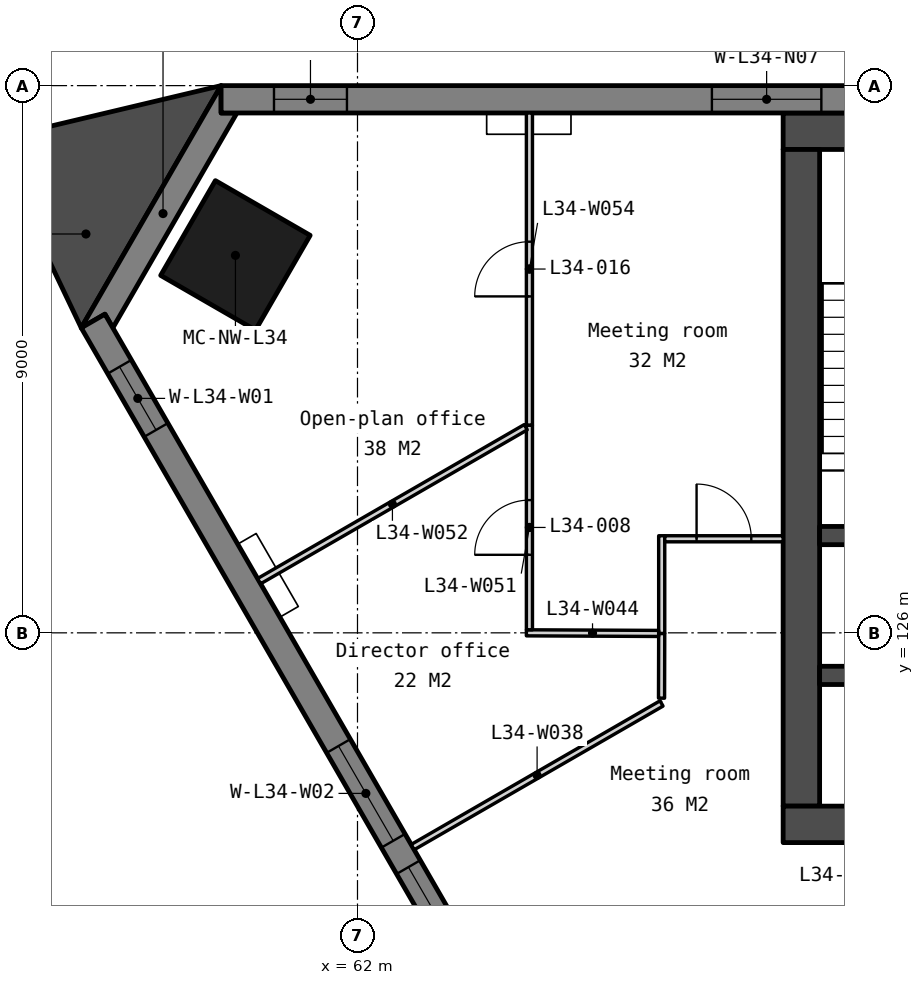
"""IFC4 building model, lengths in metres.
Left out: names, types, materials, properties, quantities, classifications, styles, units other than length and angle.
Written with IfcOpenShell. Run it as: python <this file> out.ifc"""

import sys

from ifc_helpers import new_model, si_unit, direction, frame, frame_2d, origin, origin_2d, place, context, subcontext, project, spatial, polyline, rectangle, outline, extrude, element, fill, save


model = new_model("IFC4")
c1 = context("Model", 3, precision=1e-05, world=origin(), true_north=direction((0.0, 1.0)))
c2 = subcontext(c1, "Body", "Model", "MODEL_VIEW")
j1 = project(units=[si_unit("LENGTHUNIT", "METRE"), si_unit("PLANEANGLEUNIT", "RADIAN")], contexts=[c1])
p1 = place(None, origin())
s1 = spatial("IfcSite", under=j1, at=p1, CompositionType="ELEMENT")
p2 = place(p1, origin())
s2 = spatial("IfcBuilding", under=s1, at=p2, CompositionType="ELEMENT")
p3 = place(p2, frame((0.0, 0.0, 136.4)))
s3 = spatial("IfcBuildingStorey", under=s2, at=p3, CompositionType="ELEMENT", Elevation=136.4)
p4 = place(p3, frame((59.993, 132.208, 0.0), z_axis=(0.0, 0.0, 1.0), x_axis=(-0.5, -0.866025403784, 0.0)))
e1 = element("IfcColumn", 1, at=p4, inside=s3, PredefinedType="COLUMN", context=c2, shape_type="SweptSolid", body=[
    extrude(rectangle(XDim=1.8, YDim=1.8, at=origin_2d()), origin(), (0.0, 0.0, 1.0), 3.9),
])
p5 = place(p3, frame((69.0, 134.25, 0.0), z_axis=(0.0, 0.0, 1.0), x_axis=(1.0, 0.0, 0.0)))
e2 = element("IfcWall", 2, at=p5, inside=s3, PredefinedType="SOLIDWALL", context=c2, shape_type="SweptSolid", body=[
    extrude(rectangle(XDim=22.0, YDim=0.6, at=frame_2d((11.0, 0.0))), origin(), (0.0, 0.0, 1.0), 3.75),
])
p6 = place(p3, frame((69.3, 133.95, 0.0), z_axis=(0.0, 0.0, 1.0), x_axis=(0.0, -1.0, 0.0)))
e3 = element("IfcWall", 3, at=p6, inside=s3, PredefinedType="SOLIDWALL", context=c2, shape_type="SweptSolid", body=[
    extrude(rectangle(XDim=10.8, YDim=0.6, at=frame_2d((5.4, 0.0))), origin(), (0.0, 0.0, 1.0), 3.75),
])
p7 = place(p3, frame((69.0, 122.85, 0.0), z_axis=(0.0, 0.0, 1.0), x_axis=(1.0, 0.0, 0.0)))
e4 = element("IfcWall", 4, at=p7, inside=s3, PredefinedType="SOLIDWALL", context=c2, shape_type="SweptSolid", body=[
    extrude(rectangle(XDim=22.0, YDim=0.6, at=frame_2d((11.0, 0.0))), origin(), (0.0, 0.0, 1.0), 3.75),
])
p8 = place(p7, frame((16.375, 0.0, 0.0)))
e5 = element("IfcOpeningElement", 5, at=p8, cuts=e4, PredefinedType="OPENING", context=c2, shape_type="SweptSolid", body=[
    extrude(rectangle(XDim=1.8, YDim=2.1, at=frame_2d((0.9, 1.05))), frame((0.0, 0.31, 0.0), z_axis=(0.0, -1.0, 0.0), x_axis=(1.0, 0.0, 0.0)), (0.0, 0.0, 1.0), 0.62),
])
p9 = place(p7, frame((3.825, 0.0, 0.0)))
e6 = element("IfcOpeningElement", 6, at=p9, cuts=e4, PredefinedType="OPENING", context=c2, shape_type="SweptSolid", body=[
    extrude(rectangle(XDim=1.8, YDim=2.1, at=frame_2d((0.9, 1.05))), frame((0.0, 0.31, 0.0), z_axis=(0.0, -1.0, 0.0), x_axis=(1.0, 0.0, 0.0)), (0.0, 0.0, 1.0), 0.62),
])
p10 = place(p7, frame((12.85, 0.0, 0.0)))
e7 = element("IfcOpeningElement", 7, at=p10, cuts=e4, PredefinedType="OPENING", context=c2, shape_type="SweptSolid", body=[
    extrude(rectangle(XDim=1.5, YDim=2.1, at=frame_2d((0.75, 1.05))), frame((0.0, 0.31, 0.0), z_axis=(0.0, -1.0, 0.0), x_axis=(1.0, 0.0, 0.0)), (0.0, 0.0, 1.0), 0.62),
])
for number, where, z_axis, x_axis in (
    (8, (69.6, 127.6, 0.0), (0.0, 0.0, 1.0), (1.0, 0.0, 0.0)),
    (9, (69.6, 125.3, 0.0), (0.0, 0.0, 1.0), (1.0, 0.0, 0.0)),
):
    element("IfcWall", number, at=place(p3, frame(where, z_axis=z_axis, x_axis=x_axis)), inside=s3, PredefinedType="SOLIDWALL", context=c2, shape_type="SweptSolid", body=[
        extrude(rectangle(XDim=2.55, YDim=0.3, at=frame_2d((1.275, 0.0))), origin(), (0.0, 0.0, 1.0), 3.75),
    ])
p11 = place(p3, frame((0.0, 0.0, -0.15)))
e10 = element("IfcWall", 10, at=p11, inside=s3, PredefinedType="SOLIDWALL", context=c2, shape_type="SweptSolid", body=[
    extrude(outline(polyline([(59.757, 135.0), (59.757, 134.55), (60.017, 134.55), (57.977, 131.016), (57.847, 131.241), (57.457, 131.016), (59.757, 135.0)])), origin(), (0.0, 0.0, 1.0), 3.9),
])
p12 = place(p3, frame((100.243, 134.775, -0.15), z_axis=(0.0, 0.0, 1.0), x_axis=(-1.0, 0.0, 0.0)))
e11 = element("IfcWall", 11, at=p12, inside=s3, PredefinedType="SOLIDWALL", context=c2, shape_type="SweptSolid", body=[
    extrude(outline(polyline([(40.486, 0.0), (40.486, 3.9), (0.0, 3.9), (0.0, 0.0), (40.486, 0.0)])), frame((0.0, 0.225, 0.0), z_axis=(0.0, -1.0, 0.0), x_axis=(1.0, 0.0, 0.0)), (0.0, 0.0, 1.0), 0.45),
])
p13 = place(p12, frame((0.87, 0.0, 0.95)))
e12 = element("IfcOpeningElement", 12, at=p13, cuts=e11, PredefinedType="OPENING", context=c2, shape_type="SweptSolid", body=[
    extrude(rectangle(XDim=1.2, YDim=2.2, at=frame_2d((0.6, 1.1))), frame((0.0, 0.235, 0.0), z_axis=(0.0, -1.0, 0.0), x_axis=(1.0, 0.0, 0.0)), (0.0, 0.0, 1.0), 0.47),
])
p14 = place(p12, frame((8.072, 0.0, 0.95)))
e13 = element("IfcOpeningElement", 13, at=p14, cuts=e11, PredefinedType="OPENING", context=c2, shape_type="SweptSolid", body=[
    extrude(rectangle(XDim=1.8, YDim=2.2, at=frame_2d((0.9, 1.1))), frame((0.0, 0.235, 0.0), z_axis=(0.0, -1.0, 0.0), x_axis=(1.0, 0.0, 0.0)), (0.0, 0.0, 1.0), 0.47),
])
p15 = place(p12, frame((10.372, 0.0, 0.95)))
e14 = element("IfcOpeningElement", 14, at=p15, cuts=e11, PredefinedType="OPENING", context=c2, shape_type="SweptSolid", body=[
    extrude(rectangle(XDim=1.8, YDim=2.2, at=frame_2d((0.9, 1.1))), frame((0.0, 0.235, 0.0), z_axis=(0.0, -1.0, 0.0), x_axis=(1.0, 0.0, 0.0)), (0.0, 0.0, 1.0), 0.47),
])
p16 = place(p12, frame((18.193, 0.0, 0.95)))
e15 = element("IfcOpeningElement", 15, at=p16, cuts=e11, PredefinedType="OPENING", context=c2, shape_type="SweptSolid", body=[
    extrude(rectangle(XDim=1.8, YDim=2.2, at=frame_2d((0.9, 1.1))), frame((0.0, 0.235, 0.0), z_axis=(0.0, -1.0, 0.0), x_axis=(1.0, 0.0, 0.0)), (0.0, 0.0, 1.0), 0.47),
])
p17 = place(p12, frame((20.493, 0.0, 0.95)))
e16 = element("IfcOpeningElement", 16, at=p17, cuts=e11, PredefinedType="OPENING", context=c2, shape_type="SweptSolid", body=[
    extrude(rectangle(XDim=1.8, YDim=2.2, at=frame_2d((0.9, 1.1))), frame((0.0, 0.235, 0.0), z_axis=(0.0, -1.0, 0.0), x_axis=(1.0, 0.0, 0.0)), (0.0, 0.0, 1.0), 0.47),
])
p18 = place(p12, frame((28.315, 0.0, 0.95)))
e17 = element("IfcOpeningElement", 17, at=p18, cuts=e11, PredefinedType="OPENING", context=c2, shape_type="SweptSolid", body=[
    extrude(rectangle(XDim=1.8, YDim=2.2, at=frame_2d((0.9, 1.1))), frame((0.0, 0.235, 0.0), z_axis=(0.0, -1.0, 0.0), x_axis=(1.0, 0.0, 0.0)), (0.0, 0.0, 1.0), 0.47),
])
p19 = place(p12, frame((30.615, 0.0, 0.95)))
e18 = element("IfcOpeningElement", 18, at=p19, cuts=e11, PredefinedType="OPENING", context=c2, shape_type="SweptSolid", body=[
    extrude(rectangle(XDim=1.8, YDim=2.2, at=frame_2d((0.9, 1.1))), frame((0.0, 0.235, 0.0), z_axis=(0.0, -1.0, 0.0), x_axis=(1.0, 0.0, 0.0)), (0.0, 0.0, 1.0), 0.47),
])
p20 = place(p12, frame((38.417, 0.0, 0.95)))
e19 = element("IfcOpeningElement", 19, at=p20, cuts=e11, PredefinedType="OPENING", context=c2, shape_type="SweptSolid", body=[
    extrude(rectangle(XDim=1.2, YDim=2.2, at=frame_2d((0.6, 1.1))), frame((0.0, 0.235, 0.0), z_axis=(0.0, -1.0, 0.0), x_axis=(1.0, 0.0, 0.0)), (0.0, 0.0, 1.0), 0.47),
])
p21 = place(p3, frame((57.652, 131.129, -0.15), z_axis=(0.0, 0.0, 1.0), x_axis=(0.499997369791, -0.866026922331, 0.0)))
e20 = element("IfcWall", 20, at=p21, inside=s3, PredefinedType="SOLIDWALL", context=c2, shape_type="SweptSolid", body=[
    extrude(outline(polyline([(40.486, 0.0), (40.486, 3.9), (0.0, 3.9), (0.0, 0.0), (40.486, 0.0)])), frame((0.0, 0.225, 0.0), z_axis=(0.0, -1.0, 0.0), x_axis=(1.0, 0.0, 0.0)), (0.0, 0.0, 1.0), 0.45),
])
p22 = place(p21, frame((0.87, 0.0, 0.95)))
e21 = element("IfcOpeningElement", 21, at=p22, cuts=e20, PredefinedType="OPENING", context=c2, shape_type="SweptSolid", body=[
    extrude(rectangle(XDim=1.2, YDim=2.2, at=frame_2d((0.6, 1.1))), frame((0.0, 0.235, 0.0), z_axis=(0.0, -1.0, 0.0), x_axis=(1.0, 0.0, 0.0)), (0.0, 0.0, 1.0), 0.47),
])
p23 = place(p21, frame((8.072, 0.0, 0.95)))
e22 = element("IfcOpeningElement", 22, at=p23, cuts=e20, PredefinedType="OPENING", context=c2, shape_type="SweptSolid", body=[
    extrude(rectangle(XDim=1.8, YDim=2.2, at=frame_2d((0.9, 1.1))), frame((0.0, 0.235, 0.0), z_axis=(0.0, -1.0, 0.0), x_axis=(1.0, 0.0, 0.0)), (0.0, 0.0, 1.0), 0.47),
])
p24 = place(p21, frame((10.372, 0.0, 0.95)))
e23 = element("IfcOpeningElement", 23, at=p24, cuts=e20, PredefinedType="OPENING", context=c2, shape_type="SweptSolid", body=[
    extrude(rectangle(XDim=1.8, YDim=2.2, at=frame_2d((0.9, 1.1))), frame((0.0, 0.235, 0.0), z_axis=(0.0, -1.0, 0.0), x_axis=(1.0, 0.0, 0.0)), (0.0, 0.0, 1.0), 0.47),
])
p25 = place(p21, frame((18.193, 0.0, 0.95)))
e24 = element("IfcOpeningElement", 24, at=p25, cuts=e20, PredefinedType="OPENING", context=c2, shape_type="SweptSolid", body=[
    extrude(rectangle(XDim=1.8, YDim=2.2, at=frame_2d((0.9, 1.1))), frame((0.0, 0.235, 0.0), z_axis=(0.0, -1.0, 0.0), x_axis=(1.0, 0.0, 0.0)), (0.0, 0.0, 1.0), 0.47),
])
p26 = place(p21, frame((20.493, 0.0, 0.95)))
e25 = element("IfcOpeningElement", 25, at=p26, cuts=e20, PredefinedType="OPENING", context=c2, shape_type="SweptSolid", body=[
    extrude(rectangle(XDim=1.8, YDim=2.2, at=frame_2d((0.9, 1.1))), frame((0.0, 0.235, 0.0), z_axis=(0.0, -1.0, 0.0), x_axis=(1.0, 0.0, 0.0)), (0.0, 0.0, 1.0), 0.47),
])
p27 = place(p21, frame((28.315, 0.0, 0.95)))
e26 = element("IfcOpeningElement", 26, at=p27, cuts=e20, PredefinedType="OPENING", context=c2, shape_type="SweptSolid", body=[
    extrude(rectangle(XDim=1.8, YDim=2.2, at=frame_2d((0.9, 1.1))), frame((0.0, 0.235, 0.0), z_axis=(0.0, -1.0, 0.0), x_axis=(1.0, 0.0, 0.0)), (0.0, 0.0, 1.0), 0.47),
])
p28 = place(p21, frame((30.615, 0.0, 0.95)))
e27 = element("IfcOpeningElement", 27, at=p28, cuts=e20, PredefinedType="OPENING", context=c2, shape_type="SweptSolid", body=[
    extrude(rectangle(XDim=1.8, YDim=2.2, at=frame_2d((0.9, 1.1))), frame((0.0, 0.235, 0.0), z_axis=(0.0, -1.0, 0.0), x_axis=(1.0, 0.0, 0.0)), (0.0, 0.0, 1.0), 0.47),
])
p29 = place(p21, frame((38.417, 0.0, 0.95)))
e28 = element("IfcOpeningElement", 28, at=p29, cuts=e20, PredefinedType="OPENING", context=c2, shape_type="SweptSolid", body=[
    extrude(rectangle(XDim=1.2, YDim=2.2, at=frame_2d((0.6, 1.1))), frame((0.0, 0.235, 0.0), z_axis=(0.0, -1.0, 0.0), x_axis=(1.0, 0.0, 0.0)), (0.0, 0.0, 1.0), 0.47),
])
p30 = place(p3, frame((0.0, 0.0, -0.15)))
e29 = element("IfcWall", 29, at=p30, inside=s3, PredefinedType="SOLIDWALL", context=c2, shape_type="SweptSolid", body=[
    extrude(outline(polyline([(59.757, 135.0), (55.984, 134.103), (57.457, 131.016), (59.757, 135.0)])), origin(), (0.0, 0.0, 1.0), 3.9),
])
p31 = place(p3, frame((65.438, 118.093, 0.0), z_axis=(0.0, 0.0, 1.0), x_axis=(0.866029768103, 0.499992440702, 0.0)))
e30 = element("IfcWall", 30, at=p31, inside=s3, PredefinedType="PARTITIONING", context=c2, shape_type="SweptSolid", body=[
    extrude(rectangle(XDim=8.089, YDim=0.1, at=frame_2d((4.044, 0.0))), origin(), (0.0, 0.0, 1.0), 3.75),
])
p32 = place(p31, frame((3.594, 0.0, 0.0)))
e31 = element("IfcOpeningElement", 31, at=p32, cuts=e30, PredefinedType="OPENING", context=c2, shape_type="SweptSolid", body=[
    extrude(rectangle(XDim=0.9, YDim=2.1, at=frame_2d((0.45, 1.05))), frame((0.0, 0.06, 0.0), z_axis=(0.0, -1.0, 0.0), x_axis=(1.0, 0.0, 0.0)), (0.0, 0.0, 1.0), 0.12),
])
p33 = place(p3, frame((62.907, 122.476, 0.0), z_axis=(0.0, 0.0, 1.0), x_axis=(0.866028145587, 0.499995251029, 0.0)))
e32 = element("IfcWall", 32, at=p33, inside=s3, PredefinedType="PARTITIONING", context=c2, shape_type="SweptSolid", body=[
    extrude(rectangle(XDim=4.726, YDim=0.1, at=frame_2d((2.363, 0.0))), origin(), (0.0, 0.0, 1.0), 3.75),
])
p34 = place(p3, frame((67.0, 124.926, 0.0), z_axis=(0.0, 0.0, 1.0), x_axis=(0.00252292775, 0.999996817413, 0.0)))
e33 = element("IfcWall", 33, at=p34, inside=s3, PredefinedType="PARTITIONING", context=c2, shape_type="SweptSolid", body=[
    extrude(rectangle(XDim=1.064, YDim=0.1, at=frame_2d((0.532, 0.0))), origin(), (0.0, 0.0, 1.0), 3.75),
])
p35 = place(p3, frame((67.003, 125.99, 0.0), z_axis=(0.0, 0.0, 1.0), x_axis=(0.0, 1.0, 0.0)))
e34 = element("IfcWall", 34, at=p35, inside=s3, PredefinedType="PARTITIONING", context=c2, shape_type="SweptSolid", body=[
    extrude(rectangle(XDim=1.607, YDim=0.1, at=frame_2d((0.803, 0.0))), origin(), (0.0, 0.0, 1.0), 3.75),
])
p36 = place(p3, frame((64.778, 126.0, 0.0), z_axis=(0.0, 0.0, 1.0), x_axis=(0.999989412939, -0.004601522551, 0.0)))
e35 = element("IfcWall", 35, at=p36, inside=s3, PredefinedType="PARTITIONING", context=c2, shape_type="SweptSolid", body=[
    extrude(rectangle(XDim=2.175, YDim=0.1, at=frame_2d((1.088, 0.0))), origin(), (0.0, 0.0, 1.0), 3.75),
])
p37 = place(p3, frame((67.053, 127.547, 0.0), z_axis=(0.0, 0.0, 1.0), x_axis=(0.999999992138, 0.000125391849, 0.0)))
e36 = element("IfcWall", 36, at=p37, inside=s3, PredefinedType="PARTITIONING", context=c2, shape_type="SweptSolid", body=[
    extrude(rectangle(XDim=1.947, YDim=0.1, at=frame_2d((0.974, 0.0))), origin(), (0.0, 0.0, 1.0), 3.75),
])
p38 = place(p37, frame((0.523, 0.0, 0.0)))
e37 = element("IfcOpeningElement", 37, at=p38, cuts=e36, PredefinedType="OPENING", context=c2, shape_type="SweptSolid", body=[
    extrude(rectangle(XDim=0.9, YDim=2.1, at=frame_2d((0.45, 1.05))), frame((0.0, 0.06, 0.0), z_axis=(0.0, -1.0, 0.0), x_axis=(1.0, 0.0, 0.0)), (0.0, 0.0, 1.0), 0.12),
])
p39 = place(p3, frame((64.828, 126.05, 0.0), z_axis=(0.0, 0.0, 1.0), x_axis=(0.0, 1.0, 0.0)))
e38 = element("IfcWall", 38, at=p39, inside=s3, PredefinedType="PARTITIONING", context=c2, shape_type="SweptSolid", body=[
    extrude(rectangle(XDim=3.367, YDim=0.1, at=frame_2d((1.683, 0.0))), origin(), (0.0, 0.0, 1.0), 3.75),
])
p40 = place(p39, frame((1.233, 0.0, 0.0)))
e39 = element("IfcOpeningElement", 39, at=p40, cuts=e38, PredefinedType="OPENING", context=c2, shape_type="SweptSolid", body=[
    extrude(rectangle(XDim=0.9, YDim=2.1, at=frame_2d((0.45, 1.05))), frame((0.0, 0.06, 0.0), z_axis=(0.0, -1.0, 0.0), x_axis=(1.0, 0.0, 0.0)), (0.0, 0.0, 1.0), 0.12),
])
p41 = place(p3, frame((60.382, 126.85, 0.0), z_axis=(0.0, 0.0, 1.0), x_axis=(0.866041859802, 0.499971496258, 0.0)))
e40 = element("IfcWall", 40, at=p41, inside=s3, PredefinedType="PARTITIONING", context=c2, shape_type="SweptSolid", body=[
    extrude(rectangle(XDim=5.063, YDim=0.1, at=frame_2d((2.532, 0.0))), origin(), (0.0, 0.0, 1.0), 3.75),
])
p42 = place(p3, frame((64.828, 129.417, 0.0), z_axis=(0.0, 0.0, 1.0), x_axis=(0.0, 1.0, 0.0)))
e41 = element("IfcWall", 41, at=p42, inside=s3, PredefinedType="PARTITIONING", context=c2, shape_type="SweptSolid", body=[
    extrude(rectangle(XDim=5.133, YDim=0.1, at=frame_2d((2.567, 0.0))), origin(), (0.0, 0.0, 1.0), 3.28),
])
p43 = place(p42, frame((2.117, 0.0, 0.0)))
e42 = element("IfcOpeningElement", 42, at=p43, cuts=e41, PredefinedType="OPENING", context=c2, shape_type="SweptSolid", body=[
    extrude(rectangle(XDim=0.9, YDim=2.1, at=frame_2d((0.45, 1.05))), frame((0.0, 0.06, 0.0), z_axis=(0.0, -1.0, 0.0), x_axis=(1.0, 0.0, 0.0)), (0.0, 0.0, 1.0), 0.12),
])
p44 = place(p19, origin())
e43 = element("IfcWindow", 43, at=p44, inside=s3, PartitioningType="SINGLE_PANEL", PredefinedType="WINDOW", context=c2, shape_type="SweptSolid", body=[
    extrude(rectangle(XDim=1.8, YDim=2.2, at=frame_2d((0.9, 1.1))), frame((0.0, 0.03, 0.0), z_axis=(0.0, -1.0, 0.0), x_axis=(1.0, 0.0, 0.0)), (0.0, 0.0, 1.0), 0.06),
])
fill(e18, e43)
p45 = place(p20, origin())
e44 = element("IfcWindow", 44, at=p45, inside=s3, PartitioningType="SINGLE_PANEL", PredefinedType="WINDOW", context=c2, shape_type="SweptSolid", body=[
    extrude(rectangle(XDim=1.2, YDim=2.2, at=frame_2d((0.6, 1.1))), frame((0.0, 0.03, 0.0), z_axis=(0.0, -1.0, 0.0), x_axis=(1.0, 0.0, 0.0)), (0.0, 0.0, 1.0), 0.06),
])
fill(e19, e44)
p46 = place(p22, origin())
e45 = element("IfcWindow", 45, at=p46, inside=s3, PartitioningType="SINGLE_PANEL", PredefinedType="WINDOW", context=c2, shape_type="SweptSolid", body=[
    extrude(rectangle(XDim=1.2, YDim=2.2, at=frame_2d((0.6, 1.1))), frame((0.0, 0.03, 0.0), z_axis=(0.0, -1.0, 0.0), x_axis=(1.0, 0.0, 0.0)), (0.0, 0.0, 1.0), 0.06),
])
fill(e21, e45)
p47 = place(p23, origin())
e46 = element("IfcWindow", 46, at=p47, inside=s3, PartitioningType="SINGLE_PANEL", PredefinedType="WINDOW", context=c2, shape_type="SweptSolid", body=[
    extrude(rectangle(XDim=1.8, YDim=2.2, at=frame_2d((0.9, 1.1))), frame((0.0, 0.03, 0.0), z_axis=(0.0, -1.0, 0.0), x_axis=(1.0, 0.0, 0.0)), (0.0, 0.0, 1.0), 0.06),
])
fill(e22, e46)
p48 = place(p24, origin())
e47 = element("IfcWindow", 47, at=p48, inside=s3, PartitioningType="SINGLE_PANEL", PredefinedType="WINDOW", context=c2, shape_type="SweptSolid", body=[
    extrude(rectangle(XDim=1.8, YDim=2.2, at=frame_2d((0.9, 1.1))), frame((0.0, 0.03, 0.0), z_axis=(0.0, -1.0, 0.0), x_axis=(1.0, 0.0, 0.0)), (0.0, 0.0, 1.0), 0.06),
])
fill(e23, e47)
p49 = place(p38, origin())
e48 = element("IfcDoor", 48, at=p49, inside=s3, OperationType="SINGLE_SWING_LEFT", PredefinedType="DOOR", context=c2, shape_type="SweptSolid", body=[
    extrude(rectangle(XDim=0.9, YDim=2.1, at=frame_2d((0.45, 1.05))), frame((0.0, 0.025, 0.0), z_axis=(0.0, -1.0, 0.0), x_axis=(1.0, 0.0, 0.0)), (0.0, 0.0, 1.0), 0.05),
])
fill(e37, e48)
p50 = place(p40, origin())
e49 = element("IfcDoor", 49, at=p50, inside=s3, OperationType="SINGLE_SWING_LEFT", PredefinedType="DOOR", context=c2, shape_type="SweptSolid", body=[
    extrude(rectangle(XDim=0.9, YDim=2.1, at=frame_2d((0.45, 1.05))), frame((0.0, 0.025, 0.0), z_axis=(0.0, -1.0, 0.0), x_axis=(1.0, 0.0, 0.0)), (0.0, 0.0, 1.0), 0.05),
])
fill(e39, e49)
p51 = place(p43, origin())
e50 = element("IfcDoor", 50, at=p51, inside=s3, OperationType="SINGLE_SWING_LEFT", PredefinedType="DOOR", context=c2, shape_type="SweptSolid", body=[
    extrude(rectangle(XDim=0.9, YDim=2.1, at=frame_2d((0.45, 1.05))), frame((0.0, 0.025, 0.0), z_axis=(0.0, -1.0, 0.0), x_axis=(1.0, 0.0, 0.0)), (0.0, 0.0, 1.0), 0.05),
])
fill(e42, e50)
save(model, sys.argv[1])
